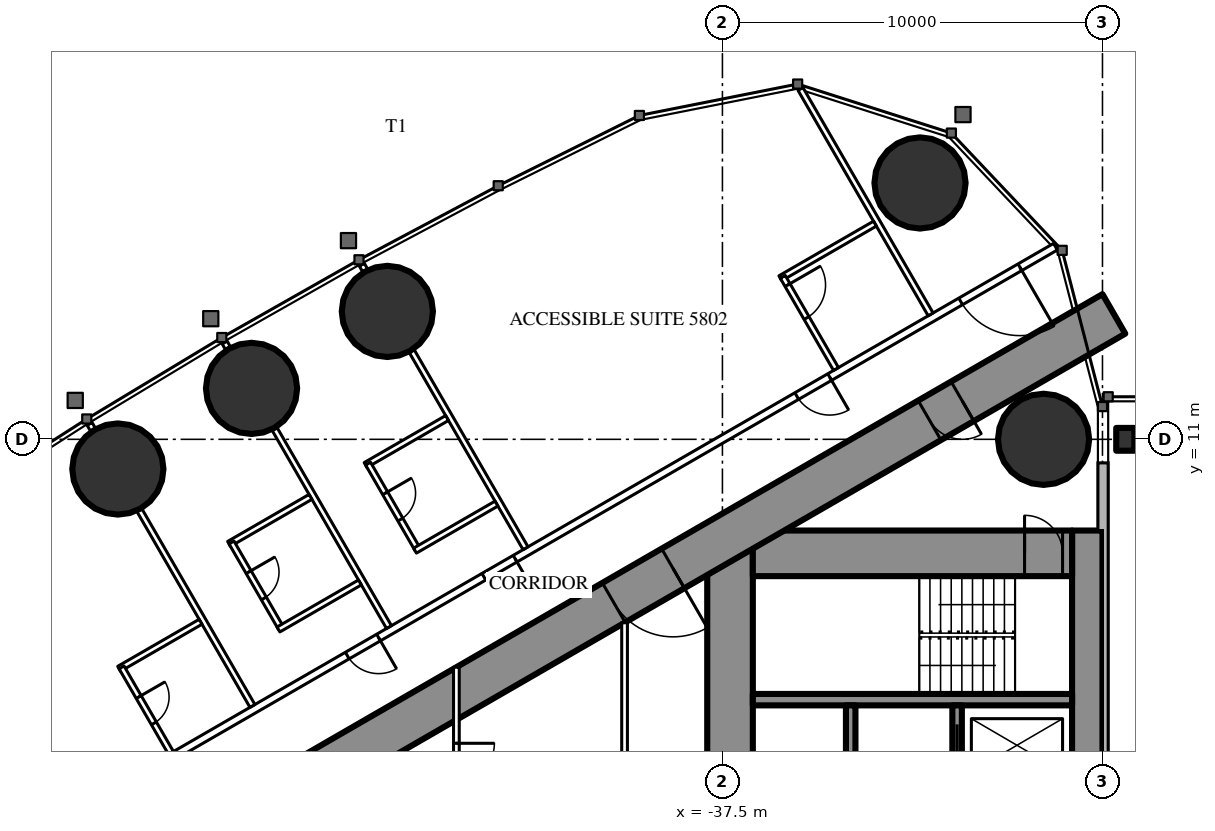
"""IFC4 building model, lengths in metres.
Left out: names, types, materials, properties, quantities, classifications, styles, units other than length and angle.
Written with IfcOpenShell. Run it as: python <this file> out.ifc"""

import sys

from ifc_helpers import new_model, si_unit, direction, frame, frame_2d, origin, origin_2d, place, context, subcontext, project, spatial, rectangle, circle, i_section, extrude, element, fill, save


model = new_model("IFC4")
c1 = context("Model", 3, precision=1e-05, world=origin(), true_north=direction((0.0, 1.0)))
c2 = subcontext(c1, "Body", "Model", "MODEL_VIEW")
j1 = project(units=[si_unit("LENGTHUNIT", "METRE"), si_unit("PLANEANGLEUNIT", "RADIAN")], contexts=[c1])
p1 = place(None, origin())
s1 = spatial("IfcSite", under=j1, at=p1, CompositionType="ELEMENT")
p2 = place(p1, origin())
s2 = spatial("IfcBuilding", under=s1, at=p2, CompositionType="ELEMENT")
p3 = place(p2, frame((0.0, 0.0, 218.9)))
s3 = spatial("IfcBuildingStorey", under=s2, at=p3, CompositionType="ELEMENT", Elevation=218.9)
for number, where, z_axis, x_axis in (
    (1, (-32.301, 17.745, 0.0), (0.0, 0.0, 1.0), (1.0, 0.0, 0.0)),
    (2, (-29.05, 11.0, 0.0), (0.0, 0.0, 1.0), (1.0, 0.0, 0.0)),
    (3, (-46.317, 14.365, 0.0), (0.0, 0.0, 1.0), (1.0, 0.0, 0.0)),
    (4, (-49.89, 12.34, 0.0), (0.0, 0.0, 1.0), (1.0, 0.0, 0.0)),
    (5, (-53.408, 10.219, 0.0), (0.0, 0.0, 1.0), (1.0, 0.0, 0.0)),
):
    element("IfcColumn", number, at=place(p3, frame(where, z_axis=z_axis, x_axis=x_axis)), inside=s3, PredefinedType="COLUMN", context=c2, shape_type="SweptSolid", body=[
        extrude(circle(Radius=1.2, at=origin_2d()), origin(), (0.0, 0.0, 1.0), 3.6),
    ])
p4 = place(p3, frame((-27.9, 8.6, 0.0), z_axis=(0.0, 0.0, 1.0), x_axis=(0.0, -1.0, 0.0)))
e6 = element("IfcWall", 6, at=p4, inside=s3, PredefinedType="SHEAR", context=c2, shape_type="SweptSolid", body=[
    extrude(rectangle(XDim=17.2, YDim=0.8, at=frame_2d((8.6, 0.0))), origin(), (0.0, 0.0, 1.0), 3.6),
])
p5 = place(p4, frame((6.95, 0.0, 0.0)))
e7 = element("IfcOpeningElement", 7, at=p5, cuts=e6, PredefinedType="OPENING", context=c2, shape_type="SweptSolid", body=[
    extrude(rectangle(XDim=0.9, YDim=2.2, at=frame_2d((0.45, 1.1))), frame((0.0, 0.41, 0.0), z_axis=(0.0, -1.0, 0.0), x_axis=(1.0, 0.0, 0.0)), (0.0, 0.0, 1.0), 0.82),
])
p6 = place(p3, frame((-37.3, 8.6, 0.0), z_axis=(0.0, 0.0, 1.0), x_axis=(0.0, -1.0, 0.0)))
e8 = element("IfcWall", 8, at=p6, inside=s3, PredefinedType="SHEAR", context=c2, shape_type="SweptSolid", body=[
    extrude(rectangle(XDim=17.2, YDim=1.2, at=frame_2d((8.6, 0.0))), origin(), (0.0, 0.0, 1.0), 3.6),
])
p7 = place(p6, frame((7.7, 0.0, 0.0)))
e9 = element("IfcOpeningElement", 9, at=p7, cuts=e8, PredefinedType="OPENING", context=c2, shape_type="SweptSolid", body=[
    extrude(rectangle(XDim=1.8, YDim=2.2, at=frame_2d((0.9, 1.1))), frame((0.0, 0.61, 0.0), z_axis=(0.0, -1.0, 0.0), x_axis=(1.0, 0.0, 0.0)), (0.0, 0.0, 1.0), 1.22),
])
p8 = place(p3, frame((-28.3, 8.0, 0.0), z_axis=(0.0, 0.0, 1.0), x_axis=(-1.0, 0.0, 0.0)))
e10 = element("IfcWall", 10, at=p8, inside=s3, PredefinedType="SHEAR", context=c2, shape_type="SweptSolid", body=[
    extrude(rectangle(XDim=8.4, YDim=1.2, at=frame_2d((4.2, 0.0))), origin(), (0.0, 0.0, 1.0), 3.6),
])
p9 = place(p8, frame((0.25, 0.0, 0.0)))
e11 = element("IfcOpeningElement", 11, at=p9, cuts=e10, PredefinedType="OPENING", context=c2, shape_type="SweptSolid", body=[
    extrude(rectangle(XDim=1.0, YDim=2.2, at=frame_2d((0.5, 1.1))), frame((0.0, 0.61, 0.0), z_axis=(0.0, -1.0, 0.0), x_axis=(1.0, 0.0, 0.0)), (0.0, 0.0, 1.0), 1.22),
])
p10 = place(p3, frame((-28.3, 4.15, 0.0), z_axis=(0.0, 0.0, 1.0), x_axis=(-1.0, 0.0, 0.0)))
e12 = element("IfcWall", 12, at=p10, inside=s3, PredefinedType="SHEAR", context=c2, shape_type="SweptSolid", body=[
    extrude(rectangle(XDim=8.4, YDim=0.3, at=frame_2d((4.2, 0.0))), origin(), (0.0, 0.0, 1.0), 3.6),
])
p11 = place(p3, frame((-31.325, 4.0, 0.0), z_axis=(0.0, 0.0, 1.0), x_axis=(0.0, -1.0, 0.0)))
e13 = element("IfcWall", 13, at=p11, inside=s3, PredefinedType="SHEAR", context=c2, shape_type="SweptSolid", body=[
    extrude(rectangle(XDim=2.1, YDim=0.25, at=frame_2d((1.05, 0.0))), origin(), (0.0, 0.0, 1.0), 3.6),
])
p12 = place(p11, frame((0.5, 0.0, 0.0)))
e14 = element("IfcOpeningElement", 14, at=p12, cuts=e13, PredefinedType="OPENING", context=c2, shape_type="SweptSolid", body=[
    extrude(rectangle(XDim=1.1, YDim=2.2, at=frame_2d((0.55, 1.1))), frame((0.0, 0.135, 0.0), z_axis=(0.0, -1.0, 0.0), x_axis=(1.0, 0.0, 0.0)), (0.0, 0.0, 1.0), 0.27),
])
p13 = place(p3, frame((-34.125, 4.0, 0.0), z_axis=(0.0, 0.0, 1.0), x_axis=(0.0, -1.0, 0.0)))
e15 = element("IfcWall", 15, at=p13, inside=s3, PredefinedType="SHEAR", context=c2, shape_type="SweptSolid", body=[
    extrude(rectangle(XDim=2.35, YDim=0.25, at=frame_2d((1.175, 0.0))), origin(), (0.0, 0.0, 1.0), 3.6),
])
p14 = place(p3, frame((-27.2, 14.3, 0.0), z_axis=(0.0, 0.0, 1.0), x_axis=(-0.866026593062, -0.499997940104, 0.0)))
e16 = element("IfcWall", 16, at=p14, inside=s3, PredefinedType="SHEAR", context=c2, shape_type="SweptSolid", body=[
    extrude(rectangle(XDim=28.946, YDim=1.2, at=frame_2d((14.473, 0.0))), origin(), (0.0, 0.0, 1.0), 3.6),
])
p15 = place(p14, frame((4.6, 0.0, 0.0)))
e17 = element("IfcOpeningElement", 17, at=p15, cuts=e16, PredefinedType="OPENING", context=c2, shape_type="SweptSolid", body=[
    extrude(rectangle(XDim=1.0, YDim=2.2, at=frame_2d((0.5, 1.1))), frame((0.0, 0.61, 0.0), z_axis=(0.0, -1.0, 0.0), x_axis=(1.0, 0.0, 0.0)), (0.0, 0.0, 1.0), 1.22),
])
p16 = place(p14, frame((13.395, 0.0, 0.0)))
e18 = element("IfcOpeningElement", 18, at=p16, cuts=e16, PredefinedType="OPENING", context=c2, shape_type="SweptSolid", body=[
    extrude(rectangle(XDim=1.8, YDim=2.2, at=frame_2d((0.9, 1.1))), frame((0.0, 0.61, 0.0), z_axis=(0.0, -1.0, 0.0), x_axis=(1.0, 0.0, 0.0)), (0.0, 0.0, 1.0), 1.22),
])
p17 = place(p3, frame((-26.9, 11.0, 0.0), z_axis=(0.0, 0.0, 1.0), x_axis=(1.0, 0.0, 0.0)))
e19 = element("IfcColumn", 19, at=p17, inside=s3, PredefinedType="COLUMN", context=c2, shape_type="SweptSolid", body=[
    extrude(i_section(OverallWidth=0.476, OverallDepth=0.6, WebThickness=0.1, FlangeThickness=0.14, FilletRadius=0.02, at=origin_2d()), origin(), (0.0, 0.0, 1.0), 3.6),
])
p18 = place(p3, frame((-28.737, 16.068, 0.0), z_axis=(0.0, 0.0, 1.0), x_axis=(-0.866026057212, -0.499998868229, 0.0)))
e20 = element("IfcWall", 20, at=p18, inside=s3, PredefinedType="PARTITIONING", context=c2, shape_type="SweptSolid", body=[
    extrude(rectangle(XDim=32.137, YDim=0.2, at=frame_2d((16.068, 0.0))), origin(), (0.0, 0.0, 1.0), 3.35),
])
p19 = place(p18, frame((1.08, 0.0, 0.0)))
e21 = element("IfcOpeningElement", 21, at=p19, cuts=e20, PredefinedType="OPENING", context=c2, shape_type="SweptSolid", body=[
    extrude(rectangle(XDim=1.8, YDim=2.03, at=frame_2d((0.9, 1.015))), frame((0.0, 0.11, 0.0), z_axis=(0.0, -1.0, 0.0), x_axis=(1.0, 0.0, 0.0)), (0.0, 0.0, 1.0), 0.22),
])
p20 = place(p18, frame((6.86, 0.0, 0.0)))
e22 = element("IfcOpeningElement", 22, at=p20, cuts=e20, PredefinedType="OPENING", context=c2, shape_type="SweptSolid", body=[
    extrude(rectangle(XDim=1.0, YDim=2.2, at=frame_2d((0.5, 1.1))), frame((0.0, 0.11, 0.0), z_axis=(0.0, -1.0, 0.0), x_axis=(1.0, 0.0, 0.0)), (0.0, 0.0, 1.0), 0.22),
])
p21 = place(p18, frame((16.418, 0.0, 0.0)))
e23 = element("IfcOpeningElement", 23, at=p21, cuts=e20, PredefinedType="OPENING", context=c2, shape_type="SweptSolid", body=[
    extrude(rectangle(XDim=0.95, YDim=2.2, at=frame_2d((0.475, 1.1))), frame((0.0, 0.11, 0.0), z_axis=(0.0, -1.0, 0.0), x_axis=(1.0, 0.0, 0.0)), (0.0, 0.0, 1.0), 0.22),
])
p22 = place(p18, frame((20.567, 0.0, 0.0)))
e24 = element("IfcOpeningElement", 24, at=p22, cuts=e20, PredefinedType="OPENING", context=c2, shape_type="SweptSolid", body=[
    extrude(rectangle(XDim=0.95, YDim=2.2, at=frame_2d((0.475, 1.1))), frame((0.0, 0.11, 0.0), z_axis=(0.0, -1.0, 0.0), x_axis=(1.0, 0.0, 0.0)), (0.0, 0.0, 1.0), 0.22),
])
p23 = place(p18, frame((27.065, 0.0, 0.0)))
e25 = element("IfcOpeningElement", 25, at=p23, cuts=e20, PredefinedType="OPENING", context=c2, shape_type="SweptSolid", body=[
    extrude(rectangle(XDim=0.95, YDim=2.2, at=frame_2d((0.475, 1.1))), frame((0.0, 0.11, 0.0), z_axis=(0.0, -1.0, 0.0), x_axis=(1.0, 0.0, 0.0)), (0.0, 0.0, 1.0), 0.22),
])
p24 = place(p3, frame((-32.022, 14.287, 0.0), z_axis=(0.0, 0.0, 1.0), x_axis=(-0.50000019414, 0.866025291697, 0.0)))
e26 = element("IfcWall", 26, at=p24, inside=s3, PredefinedType="PARTITIONING", context=c2, shape_type="SweptSolid", body=[
    extrude(rectangle(XDim=6.848, YDim=0.15, at=frame_2d((3.424, 0.0))), origin(), (0.0, 0.0, 1.0), 3.35),
])
p25 = place(p3, frame((-42.68, 8.134, 0.0), z_axis=(0.0, 0.0, 1.0), x_axis=(-0.499984479505, 0.866034364361, 0.0)))
e27 = element("IfcWall", 27, at=p25, inside=s3, PredefinedType="PARTITIONING", context=c2, shape_type="SweptSolid", body=[
    extrude(rectangle(XDim=5.995, YDim=0.15, at=frame_2d((2.998, 0.0))), origin(), (0.0, 0.0, 1.0), 2.45),
])
p26 = place(p3, frame((-46.898, 15.439, 0.0), z_axis=(0.0, 0.0, 1.0), x_axis=(-0.500232303069, 0.865891241997, 0.0)))
e28 = element("IfcWall", 28, at=p26, inside=s3, PredefinedType="PARTITIONING", context=c2, shape_type="SweptSolid", body=[
    extrude(rectangle(XDim=0.18, YDim=0.15, at=frame_2d((0.09, 0.0))), origin(), (0.0, 0.0, 1.0), 2.45),
])
p27 = place(p3, frame((-46.274, 6.059, 0.0), z_axis=(0.0, 0.0, 1.0), x_axis=(-0.500020471368, 0.866013584312, 0.0)))
e29 = element("IfcWall", 29, at=p27, inside=s3, PredefinedType="PARTITIONING", context=c2, shape_type="SweptSolid", body=[
    extrude(rectangle(XDim=6.028, YDim=0.15, at=frame_2d((3.014, 0.0))), origin(), (0.0, 0.0, 1.0), 2.45),
])
p28 = place(p3, frame((-50.508, 13.392, 0.0), z_axis=(0.0, 0.0, 1.0), x_axis=(-0.499644091975, 0.866230789891, 0.0)))
e30 = element("IfcWall", 30, at=p28, inside=s3, PredefinedType="PARTITIONING", context=c2, shape_type="SweptSolid", body=[
    extrude(rectangle(XDim=0.18, YDim=0.15, at=frame_2d((0.09, 0.0))), origin(), (0.0, 0.0, 1.0), 2.45),
])
p29 = place(p3, frame((-49.866, 3.985, 0.0), z_axis=(0.0, 0.0, 1.0), x_axis=(-0.500000694566, 0.866025002776, 0.0)))
e31 = element("IfcWall", 31, at=p29, inside=s3, PredefinedType="PARTITIONING", context=c2, shape_type="SweptSolid", body=[
    extrude(rectangle(XDim=5.95, YDim=0.15, at=frame_2d((2.975, 0.0))), origin(), (0.0, 0.0, 1.0), 2.45),
])
p30 = place(p3, frame((-54.061, 11.25, 0.0), z_axis=(0.0, 0.0, 1.0), x_axis=(-0.500391173478, 0.865799441849, 0.0)))
e32 = element("IfcWall", 32, at=p30, inside=s3, PredefinedType="PARTITIONING", context=c2, shape_type="SweptSolid", body=[
    extrude(rectangle(XDim=0.179, YDim=0.15, at=frame_2d((0.089, 0.0))), origin(), (0.0, 0.0, 1.0), 2.45),
])
p31 = place(p3, frame((-33.487, 16.675, 0.0), z_axis=(0.0, 0.0, 1.0), x_axis=(-0.866039941686, -0.499974818771, 0.0)))
e33 = element("IfcWall", 33, at=p31, inside=s3, PredefinedType="PARTITIONING", context=c2, shape_type="SweptSolid", body=[
    extrude(rectangle(XDim=2.875, YDim=0.15, at=frame_2d((1.438, 0.0))), origin(), (0.0, 0.0, 1.0), 3.35),
])
p32 = place(p3, frame((-34.511, 12.85, 0.0), z_axis=(0.0, 0.0, 1.0), x_axis=(-0.500011755427, 0.866018616679, 0.0)))
e34 = element("IfcWall", 34, at=p32, inside=s3, PredefinedType="PARTITIONING", context=c2, shape_type="SweptSolid", body=[
    extrude(rectangle(XDim=2.8, YDim=0.15, at=frame_2d((1.4, 0.0))), origin(), (0.0, 0.0, 1.0), 3.35),
])
p33 = place(p32, frame((1.55, 0.0, 0.0)))
e35 = element("IfcOpeningElement", 35, at=p33, cuts=e34, PredefinedType="OPENING", context=c2, shape_type="SweptSolid", body=[
    extrude(rectangle(XDim=1.0, YDim=2.2, at=frame_2d((0.5, 1.1))), frame((0.0, 0.085, 0.0), z_axis=(0.0, -1.0, 0.0), x_axis=(1.0, 0.0, 0.0)), (0.0, 0.0, 1.0), 0.17),
])
p34 = place(p3, frame((-44.745, 11.56, 0.0), z_axis=(0.0, 0.0, 1.0), x_axis=(-0.866006523861, -0.500032699561, 0.0)))
e36 = element("IfcWall", 36, at=p34, inside=s3, PredefinedType="PARTITIONING", context=c2, shape_type="SweptSolid", body=[
    extrude(rectangle(XDim=2.475, YDim=0.15, at=frame_2d((1.237, 0.0))), origin(), (0.0, 0.0, 1.0), 3.35),
])
p35 = place(p3, frame((-45.524, 8.109, 0.0), z_axis=(0.0, 0.0, 1.0), x_axis=(-0.49997716683, 0.86603858612, 0.0)))
e37 = element("IfcWall", 37, at=p35, inside=s3, PredefinedType="PARTITIONING", context=c2, shape_type="SweptSolid", body=[
    extrude(rectangle(XDim=2.6, YDim=0.15, at=frame_2d((1.3, 0.0))), origin(), (0.0, 0.0, 1.0), 3.35),
])
p36 = place(p35, frame((0.9, 0.0, 0.0)))
e38 = element("IfcOpeningElement", 38, at=p36, cuts=e37, PredefinedType="OPENING", context=c2, shape_type="SweptSolid", body=[
    extrude(rectangle(XDim=0.8, YDim=2.2, at=frame_2d((0.4, 1.1))), frame((0.0, 0.085, 0.0), z_axis=(0.0, -1.0, 0.0), x_axis=(1.0, 0.0, 0.0)), (0.0, 0.0, 1.0), 0.17),
])
p37 = place(p3, frame((-43.445, 9.309, 0.0), z_axis=(0.0, 0.0, 1.0), x_axis=(-0.866031185235, -0.4999899861, 0.0)))
e39 = element("IfcWall", 39, at=p37, inside=s3, PredefinedType="PARTITIONING", context=c2, shape_type="SweptSolid", body=[
    extrude(rectangle(XDim=2.475, YDim=0.15, at=frame_2d((1.238, 0.0))), origin(), (0.0, 0.0, 1.0), 3.35),
])
p38 = place(p3, frame((-48.339, 9.486, 0.0), z_axis=(0.0, 0.0, 1.0), x_axis=(-0.866006523861, -0.500032699561, 0.0)))
e40 = element("IfcWall", 40, at=p38, inside=s3, PredefinedType="PARTITIONING", context=c2, shape_type="SweptSolid", body=[
    extrude(rectangle(XDim=2.475, YDim=0.15, at=frame_2d((1.237, 0.0))), origin(), (0.0, 0.0, 1.0), 3.35),
])
p39 = place(p3, frame((-49.117, 6.034, 0.0), z_axis=(0.0, 0.0, 1.0), x_axis=(-0.500006934395, 0.866021400173, 0.0)))
e41 = element("IfcWall", 41, at=p39, inside=s3, PredefinedType="PARTITIONING", context=c2, shape_type="SweptSolid", body=[
    extrude(rectangle(XDim=2.6, YDim=0.15, at=frame_2d((1.3, 0.0))), origin(), (0.0, 0.0, 1.0), 3.35),
])
p40 = place(p39, frame((0.9, 0.0, 0.0)))
e42 = element("IfcOpeningElement", 42, at=p40, cuts=e41, PredefinedType="OPENING", context=c2, shape_type="SweptSolid", body=[
    extrude(rectangle(XDim=0.8, YDim=2.2, at=frame_2d((0.4, 1.1))), frame((0.0, 0.085, 0.0), z_axis=(0.0, -1.0, 0.0), x_axis=(1.0, 0.0, 0.0)), (0.0, 0.0, 1.0), 0.17),
])
for number, where, z_axis, x_axis in (
    (43, (-47.039, 7.234, 0.0), (0.0, 0.0, 1.0), (-0.866, -0.5, 0.0)),
    (44, (-51.231, 6.199, 0.0), (0.0, 0.0, 1.0), (-0.866, -0.5, 0.0)),
):
    element("IfcWall", number, at=place(p3, frame(where, z_axis=z_axis, x_axis=x_axis)), inside=s3, PredefinedType="PARTITIONING", context=c2, shape_type="SweptSolid", body=[
        extrude(rectangle(XDim=2.475, YDim=0.15, at=frame_2d((1.238, 0.0))), origin(), (0.0, 0.0, 1.0), 3.35),
    ])
p41 = place(p3, frame((-52.01, 2.747, 0.0), z_axis=(0.0, 0.0, 1.0), x_axis=(-0.500006934395, 0.866021400173, 0.0)))
e45 = element("IfcWall", 45, at=p41, inside=s3, PredefinedType="PARTITIONING", context=c2, shape_type="SweptSolid", body=[
    extrude(rectangle(XDim=2.6, YDim=0.15, at=frame_2d((1.3, 0.0))), origin(), (0.0, 0.0, 1.0), 3.35),
])
p42 = place(p41, frame((0.9, 0.0, 0.0)))
e46 = element("IfcOpeningElement", 46, at=p42, cuts=e45, PredefinedType="OPENING", context=c2, shape_type="SweptSolid", body=[
    extrude(rectangle(XDim=0.8, YDim=2.2, at=frame_2d((0.4, 1.1))), frame((0.0, 0.085, 0.0), z_axis=(0.0, -1.0, 0.0), x_axis=(1.0, 0.0, 0.0)), (0.0, 0.0, 1.0), 0.17),
])
p43 = place(p3, frame((-40.075, 6.174, 0.0), z_axis=(0.0, 0.0, 1.0), x_axis=(0.0, -1.0, 0.0)))
e47 = element("IfcWall", 47, at=p43, inside=s3, PredefinedType="PARTITIONING", context=c2, shape_type="SweptSolid", body=[
    extrude(rectangle(XDim=12.348, YDim=0.15, at=frame_2d((6.174, 0.0))), origin(), (0.0, 0.0, 1.0), 3.35),
])
p44 = place(p43, frame((5.274, 0.0, 0.0)))
e48 = element("IfcOpeningElement", 48, at=p44, cuts=e47, PredefinedType="OPENING", context=c2, shape_type="SweptSolid", body=[
    extrude(rectangle(XDim=1.8, YDim=2.2, at=frame_2d((0.9, 1.1))), frame((0.0, 0.085, 0.0), z_axis=(0.0, -1.0, 0.0), x_axis=(1.0, 0.0, 0.0)), (0.0, 0.0, 1.0), 0.17),
])
p45 = place(p3, frame((-44.5, 5.005, 0.0), z_axis=(0.0, 0.0, 1.0), x_axis=(0.0, -1.0, 0.0)))
e49 = element("IfcWall", 49, at=p45, inside=s3, PredefinedType="PARTITIONING", context=c2, shape_type="SweptSolid", body=[
    extrude(rectangle(XDim=10.009, YDim=0.15, at=frame_2d((5.005, 0.0))), origin(), (0.0, 0.0, 1.0), 2.5),
])
p46 = place(p45, frame((2.002, 0.0, 0.0)))
e50 = element("IfcOpeningElement", 50, at=p46, cuts=e49, PredefinedType="OPENING", context=c2, shape_type="SweptSolid", body=[
    extrude(rectangle(XDim=1.0, YDim=2.2, at=frame_2d((0.5, 1.1))), frame((0.0, 0.085, 0.0), z_axis=(0.0, -1.0, 0.0), x_axis=(1.0, 0.0, 0.0)), (0.0, 0.0, 1.0), 0.17),
])
p47 = place(p45, frame((7.007, 0.0, 0.0)))
e51 = element("IfcOpeningElement", 51, at=p47, cuts=e49, PredefinedType="OPENING", context=c2, shape_type="SweptSolid", body=[
    extrude(rectangle(XDim=1.0, YDim=2.2, at=frame_2d((0.5, 1.1))), frame((0.0, 0.085, 0.0), z_axis=(0.0, -1.0, 0.0), x_axis=(1.0, 0.0, 0.0)), (0.0, 0.0, 1.0), 0.17),
])
p48 = place(p19, origin())
e52 = element("IfcDoor", 52, at=p48, inside=s3, OperationType="DOUBLE_DOOR_SINGLE_SWING", PredefinedType="DOOR", context=c2, shape_type="SweptSolid", body=[
    extrude(rectangle(XDim=1.8, YDim=2.03, at=frame_2d((0.9, 1.015))), frame((0.0, 0.025, 0.0), z_axis=(0.0, -1.0, 0.0), x_axis=(1.0, 0.0, 0.0)), (0.0, 0.0, 1.0), 0.05),
])
fill(e21, e52)
p49 = place(p33, origin())
e53 = element("IfcDoor", 53, at=p49, inside=s3, OperationType="SINGLE_SWING_RIGHT", PredefinedType="DOOR", context=c2, shape_type="SweptSolid", body=[
    extrude(rectangle(XDim=1.0, YDim=2.2, at=frame_2d((0.5, 1.1))), frame((0.0, 0.025, 0.0), z_axis=(0.0, -1.0, 0.0), x_axis=(1.0, 0.0, 0.0)), (0.0, 0.0, 1.0), 0.05),
])
fill(e35, e53)
p50 = place(p20, origin())
e54 = element("IfcDoor", 54, at=p50, inside=s3, OperationType="SINGLE_SWING_LEFT", PredefinedType="DOOR", context=c2, shape_type="SweptSolid", body=[
    extrude(rectangle(XDim=1.0, YDim=2.2, at=frame_2d((0.5, 1.1))), frame((0.0, 0.025, 0.0), z_axis=(0.0, -1.0, 0.0), x_axis=(1.0, 0.0, 0.0)), (0.0, 0.0, 1.0), 0.05),
])
fill(e22, e54)
p51 = place(p36, origin())
e55 = element("IfcDoor", 55, at=p51, inside=s3, OperationType="SINGLE_SWING_RIGHT", PredefinedType="DOOR", context=c2, shape_type="SweptSolid", body=[
    extrude(rectangle(XDim=0.8, YDim=2.2, at=frame_2d((0.4, 1.1))), frame((0.0, 0.025, 0.0), z_axis=(0.0, -1.0, 0.0), x_axis=(1.0, 0.0, 0.0)), (0.0, 0.0, 1.0), 0.05),
])
fill(e38, e55)
p52 = place(p21, origin())
e56 = element("IfcDoor", 56, at=p52, inside=s3, OperationType="SINGLE_SWING_LEFT", PredefinedType="DOOR", context=c2, shape_type="SweptSolid", body=[
    extrude(rectangle(XDim=0.95, YDim=2.2, at=frame_2d((0.475, 1.1))), frame((0.0, 0.025, 0.0), z_axis=(0.0, -1.0, 0.0), x_axis=(1.0, 0.0, 0.0)), (0.0, 0.0, 1.0), 0.05),
])
fill(e23, e56)
p53 = place(p40, origin())
e57 = element("IfcDoor", 57, at=p53, inside=s3, OperationType="SINGLE_SWING_RIGHT", PredefinedType="DOOR", context=c2, shape_type="SweptSolid", body=[
    extrude(rectangle(XDim=0.8, YDim=2.2, at=frame_2d((0.4, 1.1))), frame((0.0, 0.025, 0.0), z_axis=(0.0, -1.0, 0.0), x_axis=(1.0, 0.0, 0.0)), (0.0, 0.0, 1.0), 0.05),
])
fill(e42, e57)
p54 = place(p22, origin())
e58 = element("IfcDoor", 58, at=p54, inside=s3, OperationType="SINGLE_SWING_LEFT", PredefinedType="DOOR", context=c2, shape_type="SweptSolid", body=[
    extrude(rectangle(XDim=0.95, YDim=2.2, at=frame_2d((0.475, 1.1))), frame((0.0, 0.025, 0.0), z_axis=(0.0, -1.0, 0.0), x_axis=(1.0, 0.0, 0.0)), (0.0, 0.0, 1.0), 0.05),
])
fill(e24, e58)
p55 = place(p42, origin())
e59 = element("IfcDoor", 59, at=p55, inside=s3, OperationType="SINGLE_SWING_RIGHT", PredefinedType="DOOR", context=c2, shape_type="SweptSolid", body=[
    extrude(rectangle(XDim=0.8, YDim=2.2, at=frame_2d((0.4, 1.1))), frame((0.0, 0.025, 0.0), z_axis=(0.0, -1.0, 0.0), x_axis=(1.0, 0.0, 0.0)), (0.0, 0.0, 1.0), 0.05),
])
fill(e46, e59)
p56 = place(p46, origin())
e60 = element("IfcDoor", 60, at=p56, inside=s3, OperationType="SINGLE_SWING_LEFT", PredefinedType="DOOR", context=c2, shape_type="SweptSolid", body=[
    extrude(rectangle(XDim=1.0, YDim=2.2, at=frame_2d((0.5, 1.1))), frame((0.0, 0.025, 0.0), z_axis=(0.0, -1.0, 0.0), x_axis=(1.0, 0.0, 0.0)), (0.0, 0.0, 1.0), 0.05),
])
fill(e50, e60)
p57 = place(p15, origin())
e61 = element("IfcDoor", 61, at=p57, inside=s3, OperationType="SINGLE_SWING_LEFT", PredefinedType="DOOR", context=c2, shape_type="SweptSolid", body=[
    extrude(rectangle(XDim=1.0, YDim=2.2, at=frame_2d((0.5, 1.1))), frame((0.0, 0.025, 0.0), z_axis=(0.0, -1.0, 0.0), x_axis=(1.0, 0.0, 0.0)), (0.0, 0.0, 1.0), 0.05),
])
fill(e17, e61)
p58 = place(p16, origin())
e62 = element("IfcDoor", 62, at=p58, inside=s3, OperationType="DOUBLE_DOOR_SINGLE_SWING", PredefinedType="DOOR", context=c2, shape_type="SweptSolid", body=[
    extrude(rectangle(XDim=1.8, YDim=2.2, at=frame_2d((0.9, 1.1))), frame((0.0, 0.025, 0.0), z_axis=(0.0, -1.0, 0.0), x_axis=(1.0, 0.0, 0.0)), (0.0, 0.0, 1.0), 0.05),
])
fill(e18, e62)
p59 = place(p9, origin())
e63 = element("IfcDoor", 63, at=p59, inside=s3, OperationType="SINGLE_SWING_RIGHT", PredefinedType="DOOR", context=c2, shape_type="SweptSolid", body=[
    extrude(rectangle(XDim=1.0, YDim=2.2, at=frame_2d((0.5, 1.1))), frame((0.0, 0.025, 0.0), z_axis=(0.0, -1.0, 0.0), x_axis=(1.0, 0.0, 0.0)), (0.0, 0.0, 1.0), 0.05),
])
fill(e11, e63)
p60 = place(p12, origin())
e64 = element("IfcDoor", 64, at=p60, inside=s3, OperationType="SLIDING_TO_LEFT", PredefinedType="USERDEFINED", context=c2, shape_type="SweptSolid", body=[
    extrude(rectangle(XDim=1.1, YDim=2.2, at=frame_2d((0.55, 1.1))), frame((0.0, 0.025, 0.0), z_axis=(0.0, -1.0, 0.0), x_axis=(1.0, 0.0, 0.0)), (0.0, 0.0, 1.0), 0.05),
])
fill(e14, e64)
save(model, sys.argv[1])
